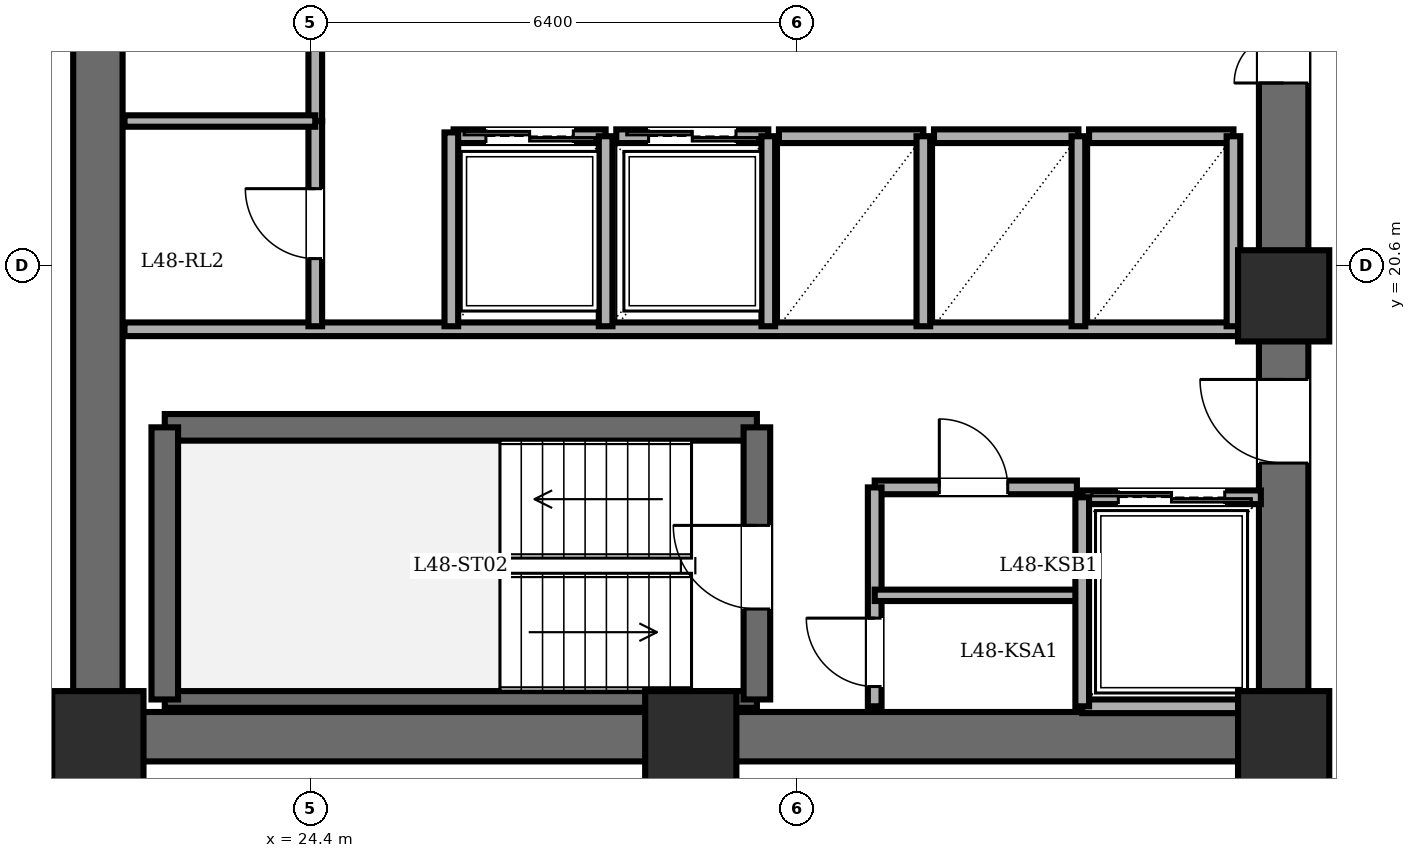
"""IFC4 building model, lengths in metres.
Left out: names, types, materials, properties, quantities, classifications, styles, units other than length and angle.
Written with IfcOpenShell. Run it as: python <this file> out.ifc"""

import sys

from ifc_helpers import new_model, si_unit, direction, frame, frame_2d, origin, origin_2d, place, context, subcontext, project, spatial, rectangle, extrude, element, fill, save


model = new_model("IFC4")
c1 = context("Model", 3, precision=1e-05, world=origin(), true_north=direction((0.0, 1.0)))
c2 = subcontext(c1, "Body", "Model", "MODEL_VIEW")
j1 = project(units=[si_unit("LENGTHUNIT", "METRE"), si_unit("PLANEANGLEUNIT", "RADIAN")], contexts=[c1])
p1 = place(None, origin())
s1 = spatial("IfcSite", under=j1, at=p1, CompositionType="ELEMENT")
p2 = place(p1, origin())
s2 = spatial("IfcBuilding", under=s1, at=p2, CompositionType="ELEMENT")
p3 = place(p2, frame((0.0, 0.0, 183.4)))
s3 = spatial("IfcBuildingStorey", under=s2, at=p3, CompositionType="ELEMENT", Elevation=183.4)
for number, where, z_axis, x_axis in (
    (1, (21.6, 14.4, 0.0), (0.0, 0.0, 1.0), (1.0, 0.0, 0.0)),
    (2, (29.4, 14.4, 0.0), (0.0, 0.0, 1.0), (1.0, 0.0, 0.0)),
    (3, (37.2, 14.4, 0.0), (0.0, 0.0, 1.0), (1.0, 0.0, 0.0)),
    (4, (37.2, 20.2, 0.0), (0.0, 0.0, 1.0), (1.0, 0.0, 0.0)),
):
    element("IfcColumn", number, at=place(p3, frame(where, z_axis=z_axis, x_axis=x_axis)), inside=s3, PredefinedType="COLUMN", context=c2, shape_type="SweptSolid", body=[
        extrude(rectangle(XDim=1.2, YDim=1.2, at=origin_2d()), origin(), (0.0, 0.0, 1.0), 3.6),
    ])
p4 = place(p3, frame((21.6, 14.4, 0.0), z_axis=(0.0, 0.0, 1.0), x_axis=(0.0, 1.0, 0.0)))
e5 = element("IfcWall", 5, at=p4, inside=s3, PredefinedType="SHEAR", context=c2, shape_type="SweptSolid", body=[
    extrude(rectangle(XDim=19.2, YDim=0.65, at=frame_2d((9.6, 0.0))), origin(), (0.0, 0.0, 1.0), 3.4),
])
p5 = place(p3, frame((37.2, 14.4, 0.0), z_axis=(0.0, 0.0, 1.0), x_axis=(-1.0, 0.0, 0.0)))
e6 = element("IfcWall", 6, at=p5, inside=s3, PredefinedType="SHEAR", context=c2, shape_type="SweptSolid", body=[
    extrude(rectangle(XDim=15.6, YDim=0.65, at=frame_2d((7.8, 0.0))), origin(), (0.0, 0.0, 1.0), 3.4),
])
p6 = place(p3, frame((37.2, 14.4, 0.0), z_axis=(0.0, 0.0, 1.0), x_axis=(0.0, 1.0, 0.0)))
e7 = element("IfcWall", 7, at=p6, inside=s3, PredefinedType="SHEAR", context=c2, shape_type="SweptSolid", body=[
    extrude(rectangle(XDim=19.2, YDim=0.65, at=frame_2d((9.6, 0.0))), origin(), (0.0, 0.0, 1.0), 3.4),
])
p7 = place(p6, frame((15.8, 0.0, 0.0)))
e8 = element("IfcOpeningElement", 8, at=p7, cuts=e7, PredefinedType="OPENING", context=c2, shape_type="SweptSolid", body=[
    extrude(rectangle(XDim=1.15, YDim=2.15, at=frame_2d((0.575, 1.075))), frame((0.0, 0.335, 0.0), z_axis=(0.0, -1.0, 0.0), x_axis=(1.0, 0.0, 0.0)), (0.0, 0.0, 1.0), 0.67),
])
p8 = place(p6, frame((3.6, 0.0, 0.0)))
e9 = element("IfcOpeningElement", 9, at=p8, cuts=e7, PredefinedType="OPENING", context=c2, shape_type="SweptSolid", body=[
    extrude(rectangle(XDim=1.1, YDim=2.15, at=frame_2d((0.55, 1.075))), frame((0.0, 0.335, 0.0), z_axis=(0.0, -1.0, 0.0), x_axis=(1.0, 0.0, 0.0)), (0.0, 0.0, 1.0), 0.67),
])
p9 = place(p6, frame((8.6, 0.0, 0.0)))
e10 = element("IfcOpeningElement", 10, at=p9, cuts=e7, PredefinedType="OPENING", context=c2, shape_type="SweptSolid", body=[
    extrude(rectangle(XDim=1.3, YDim=2.2, at=frame_2d((0.65, 1.1))), frame((0.0, 0.335, 0.0), z_axis=(0.0, -1.0, 0.0), x_axis=(1.0, 0.0, 0.0)), (0.0, 0.0, 1.0), 0.67),
])
p10 = place(p3, frame((22.48, 18.47, 0.0), z_axis=(0.0, 0.0, 1.0), x_axis=(1.0, 0.0, 0.0)))
e11 = element("IfcWall", 11, at=p10, inside=s3, PredefinedType="SOLIDWALL", context=c2, shape_type="SweptSolid", body=[
    extrude(rectangle(XDim=7.79, YDim=0.35, at=frame_2d((3.895, 0.0))), origin(), (0.0, 0.0, 1.0), 3.4),
])
p11 = place(p3, frame((22.48, 14.89, 0.0), z_axis=(0.0, 0.0, 1.0), x_axis=(1.0, 0.0, 0.0)))
e12 = element("IfcWall", 12, at=p11, inside=s3, PredefinedType="PARTITIONING", context=c2, shape_type="SweptSolid", body=[
    extrude(rectangle(XDim=7.79, YDim=0.22, at=frame_2d((3.895, 0.0))), origin(), (0.0, 0.0, 1.0), 3.4),
])
p12 = place(p3, frame((22.48, 14.89, 0.0), z_axis=(0.0, 0.0, 1.0), x_axis=(0.0, 1.0, 0.0)))
e13 = element("IfcWall", 13, at=p12, inside=s3, PredefinedType="SOLIDWALL", context=c2, shape_type="SweptSolid", body=[
    extrude(rectangle(XDim=3.58, YDim=0.35, at=frame_2d((1.79, 0.0))), origin(), (0.0, 0.0, 1.0), 3.4),
])
p13 = place(p3, frame((30.27, 14.89, 0.0), z_axis=(0.0, 0.0, 1.0), x_axis=(0.0, 1.0, 0.0)))
e14 = element("IfcWall", 14, at=p13, inside=s3, PredefinedType="SOLIDWALL", context=c2, shape_type="SweptSolid", body=[
    extrude(rectangle(XDim=3.58, YDim=0.35, at=frame_2d((1.79, 0.0))), origin(), (0.0, 0.0, 1.0), 3.4),
])
p14 = place(p13, frame((1.19, 0.0, 0.0)))
e15 = element("IfcOpeningElement", 15, at=p14, cuts=e14, PredefinedType="OPENING", context=c2, shape_type="SweptSolid", body=[
    extrude(rectangle(XDim=1.1, YDim=2.15, at=frame_2d((0.55, 1.075))), frame((0.0, 0.185, 0.0), z_axis=(0.0, -1.0, 0.0), x_axis=(1.0, 0.0, 0.0)), (0.0, 0.0, 1.0), 0.37),
])
p15 = place(p3, frame((21.95, 19.76, 0.0), z_axis=(0.0, 0.0, 1.0), x_axis=(1.0, 0.0, 0.0)))
e16 = element("IfcWall", 16, at=p15, inside=s3, PredefinedType="PARTITIONING", context=c2, shape_type="SweptSolid", body=[
    extrude(rectangle(XDim=14.87, YDim=0.18, at=frame_2d((7.435, 0.0))), origin(), (0.0, 0.0, 1.0), 3.4),
])
p16 = place(p3, frame((31.82, 17.68, 0.0), z_axis=(0.0, 0.0, 1.0), x_axis=(1.0, 0.0, 0.0)))
e17 = element("IfcWall", 17, at=p16, inside=s3, PredefinedType="PARTITIONING", context=c2, shape_type="SweptSolid", body=[
    extrude(rectangle(XDim=2.66, YDim=0.18, at=frame_2d((1.33, 0.0))), origin(), (0.0, 0.0, 1.0), 3.4),
])
p17 = place(p16, frame((0.85, 0.0, 0.0)))
e18 = element("IfcOpeningElement", 18, at=p17, cuts=e17, PredefinedType="OPENING", context=c2, shape_type="SweptSolid", body=[
    extrude(rectangle(XDim=0.9, YDim=2.05, at=frame_2d((0.45, 1.025))), frame((0.0, 0.1, 0.0), z_axis=(0.0, -1.0, 0.0), x_axis=(1.0, 0.0, 0.0)), (0.0, 0.0, 1.0), 0.2),
])
p18 = place(p3, frame((31.82, 14.8, 0.0), z_axis=(0.0, 0.0, 1.0), x_axis=(0.0, 1.0, 0.0)))
e19 = element("IfcWall", 19, at=p18, inside=s3, PredefinedType="PARTITIONING", context=c2, shape_type="SweptSolid", body=[
    extrude(rectangle(XDim=2.88, YDim=0.18, at=frame_2d((1.44, 0.0))), origin(), (0.0, 0.0, 1.0), 3.4),
])
p19 = place(p18, frame((0.26, 0.0, 0.0)))
e20 = element("IfcOpeningElement", 20, at=p19, cuts=e19, PredefinedType="OPENING", context=c2, shape_type="SweptSolid", body=[
    extrude(rectangle(XDim=0.9, YDim=2.05, at=frame_2d((0.45, 1.025))), frame((0.0, 0.1, 0.0), z_axis=(0.0, -1.0, 0.0), x_axis=(1.0, 0.0, 0.0)), (0.0, 0.0, 1.0), 0.2),
])
p20 = place(p3, frame((31.82, 16.26, 0.0), z_axis=(0.0, 0.0, 1.0), x_axis=(1.0, 0.0, 0.0)))
e21 = element("IfcWall", 21, at=p20, inside=s3, PredefinedType="PARTITIONING", context=c2, shape_type="SweptSolid", body=[
    extrude(rectangle(XDim=2.66, YDim=0.15, at=frame_2d((1.33, 0.0))), origin(), (0.0, 0.0, 1.0), 3.4),
])
p21 = place(p3, frame((34.55, 17.55, 0.0), z_axis=(0.0, 0.0, 1.0), x_axis=(1.0, 0.0, 0.0)))
e22 = element("IfcWall", 22, at=p21, inside=s3, PredefinedType="PARTITIONING", context=c2, shape_type="SweptSolid", body=[
    extrude(rectangle(XDim=2.35, YDim=0.18, at=frame_2d((1.175, 0.0))), origin(), (0.0, 0.0, 1.0), 3.4),
])
p22 = place(p21, frame((0.475, 0.0, 0.0)))
e23 = element("IfcOpeningElement", 23, at=p22, cuts=e22, PredefinedType="OPENING", context=c2, shape_type="SweptSolid", body=[
    extrude(rectangle(XDim=1.4, YDim=2.3, at=frame_2d((0.7, 1.15))), frame((0.0, 0.1, 0.0), z_axis=(0.0, -1.0, 0.0), x_axis=(1.0, 0.0, 0.0)), (0.0, 0.0, 1.0), 0.2),
])
p23 = place(p3, frame((36.9, 14.8, 0.0), z_axis=(0.0, 0.0, 1.0), x_axis=(-1.0, 0.0, 0.0)))
e24 = element("IfcWall", 24, at=p23, inside=s3, PredefinedType="PARTITIONING", context=c2, shape_type="SweptSolid", body=[
    extrude(rectangle(XDim=2.35, YDim=0.18, at=frame_2d((1.175, 0.0))), origin(), (0.0, 0.0, 1.0), 3.4),
])
p24 = place(p3, frame((34.55, 17.55, 0.0), z_axis=(0.0, 0.0, 1.0), x_axis=(0.0, -1.0, 0.0)))
e25 = element("IfcWall", 25, at=p24, inside=s3, PredefinedType="PARTITIONING", context=c2, shape_type="SweptSolid", body=[
    extrude(rectangle(XDim=2.75, YDim=0.18, at=frame_2d((1.375, 0.0))), origin(), (0.0, 0.0, 1.0), 3.4),
])
p25 = place(p3, frame((26.28, 22.3, 0.0), z_axis=(0.0, 0.0, 1.0), x_axis=(1.0, 0.0, 0.0)))
e26 = element("IfcWall", 26, at=p25, inside=s3, PredefinedType="PARTITIONING", context=c2, shape_type="SweptSolid", body=[
    extrude(rectangle(XDim=2.0, YDim=0.18, at=frame_2d((1.0, 0.0))), origin(), (0.0, 0.0, 1.0), 3.4),
])
p26 = place(p25, frame((0.425, 0.0, 0.0)))
e27 = element("IfcOpeningElement", 27, at=p26, cuts=e26, PredefinedType="OPENING", context=c2, shape_type="SweptSolid", body=[
    extrude(rectangle(XDim=1.15, YDim=2.2, at=frame_2d((0.575, 1.1))), frame((0.0, 0.1, 0.0), z_axis=(0.0, -1.0, 0.0), x_axis=(1.0, 0.0, 0.0)), (0.0, 0.0, 1.0), 0.2),
])
p27 = place(p3, frame((28.28, 19.8, 0.0), z_axis=(0.0, 0.0, 1.0), x_axis=(0.0, 1.0, 0.0)))
e28 = element("IfcWall", 28, at=p27, inside=s3, PredefinedType="PARTITIONING", context=c2, shape_type="SweptSolid", body=[
    extrude(rectangle(XDim=2.5, YDim=0.18, at=frame_2d((1.25, 0.0))), origin(), (0.0, 0.0, 1.0), 3.4),
])
p28 = place(p3, frame((28.42, 22.3, 0.0), z_axis=(0.0, 0.0, 1.0), x_axis=(1.0, 0.0, 0.0)))
e29 = element("IfcWall", 29, at=p28, inside=s3, PredefinedType="PARTITIONING", context=c2, shape_type="SweptSolid", body=[
    extrude(rectangle(XDim=2.0, YDim=0.18, at=frame_2d((1.0, 0.0))), origin(), (0.0, 0.0, 1.0), 3.4),
])
p29 = place(p28, frame((0.425, 0.0, 0.0)))
e30 = element("IfcOpeningElement", 30, at=p29, cuts=e29, PredefinedType="OPENING", context=c2, shape_type="SweptSolid", body=[
    extrude(rectangle(XDim=1.15, YDim=2.2, at=frame_2d((0.575, 1.1))), frame((0.0, 0.1, 0.0), z_axis=(0.0, -1.0, 0.0), x_axis=(1.0, 0.0, 0.0)), (0.0, 0.0, 1.0), 0.2),
])
p30 = place(p3, frame((30.42, 19.8, 0.0), z_axis=(0.0, 0.0, 1.0), x_axis=(0.0, 1.0, 0.0)))
e31 = element("IfcWall", 31, at=p30, inside=s3, PredefinedType="PARTITIONING", context=c2, shape_type="SweptSolid", body=[
    extrude(rectangle(XDim=2.5, YDim=0.18, at=frame_2d((1.25, 0.0))), origin(), (0.0, 0.0, 1.0), 3.4),
])
p31 = place(p3, frame((30.56, 22.3, 0.0), z_axis=(0.0, 0.0, 1.0), x_axis=(1.0, 0.0, 0.0)))
e32 = element("IfcWall", 32, at=p31, inside=s3, PredefinedType="PARTITIONING", context=c2, shape_type="SweptSolid", body=[
    extrude(rectangle(XDim=1.9, YDim=0.18, at=frame_2d((0.95, 0.0))), origin(), (0.0, 0.0, 1.0), 3.4),
])
p32 = place(p3, frame((32.46, 19.8, 0.0), z_axis=(0.0, 0.0, 1.0), x_axis=(0.0, 1.0, 0.0)))
e33 = element("IfcWall", 33, at=p32, inside=s3, PredefinedType="PARTITIONING", context=c2, shape_type="SweptSolid", body=[
    extrude(rectangle(XDim=2.5, YDim=0.18, at=frame_2d((1.25, 0.0))), origin(), (0.0, 0.0, 1.0), 3.4),
])
p33 = place(p3, frame((32.6, 22.3, 0.0), z_axis=(0.0, 0.0, 1.0), x_axis=(1.0, 0.0, 0.0)))
e34 = element("IfcWall", 34, at=p33, inside=s3, PredefinedType="PARTITIONING", context=c2, shape_type="SweptSolid", body=[
    extrude(rectangle(XDim=1.9, YDim=0.18, at=frame_2d((0.95, 0.0))), origin(), (0.0, 0.0, 1.0), 3.4),
])
p34 = place(p3, frame((34.5, 19.8, 0.0), z_axis=(0.0, 0.0, 1.0), x_axis=(0.0, 1.0, 0.0)))
e35 = element("IfcWall", 35, at=p34, inside=s3, PredefinedType="PARTITIONING", context=c2, shape_type="SweptSolid", body=[
    extrude(rectangle(XDim=2.5, YDim=0.18, at=frame_2d((1.25, 0.0))), origin(), (0.0, 0.0, 1.0), 3.4),
])
p35 = place(p3, frame((34.64, 22.3, 0.0), z_axis=(0.0, 0.0, 1.0), x_axis=(1.0, 0.0, 0.0)))
e36 = element("IfcWall", 36, at=p35, inside=s3, PredefinedType="PARTITIONING", context=c2, shape_type="SweptSolid", body=[
    extrude(rectangle(XDim=1.9, YDim=0.18, at=frame_2d((0.95, 0.0))), origin(), (0.0, 0.0, 1.0), 3.4),
])
p36 = place(p3, frame((36.54, 19.8, 0.0), z_axis=(0.0, 0.0, 1.0), x_axis=(0.0, 1.0, 0.0)))
e37 = element("IfcWall", 37, at=p36, inside=s3, PredefinedType="PARTITIONING", context=c2, shape_type="SweptSolid", body=[
    extrude(rectangle(XDim=2.5, YDim=0.18, at=frame_2d((1.25, 0.0))), origin(), (0.0, 0.0, 1.0), 3.4),
])
p37 = place(p3, frame((24.46, 22.5, 0.0), z_axis=(0.0, 0.0, 1.0), x_axis=(0.0, 1.0, 0.0)))
e38 = element("IfcWall", 38, at=p37, inside=s3, PredefinedType="PARTITIONING", context=c2, shape_type="SweptSolid", body=[
    extrude(rectangle(XDim=5.0, YDim=0.18, at=frame_2d((2.5, 0.0))), origin(), (0.0, 0.0, 1.0), 3.4),
])
p38 = place(p37, frame((2.04, 0.0, 0.0)))
e39 = element("IfcOpeningElement", 39, at=p38, cuts=e38, PredefinedType="OPENING", context=c2, shape_type="SweptSolid", body=[
    extrude(rectangle(XDim=0.92, YDim=2.1, at=frame_2d((0.46, 1.05))), frame((0.0, 0.1, 0.0), z_axis=(0.0, -1.0, 0.0), x_axis=(1.0, 0.0, 0.0)), (0.0, 0.0, 1.0), 0.2),
])
p39 = place(p3, frame((24.46, 19.8, 0.0), z_axis=(0.0, 0.0, 1.0), x_axis=(0.0, 1.0, 0.0)))
e40 = element("IfcWall", 40, at=p39, inside=s3, PredefinedType="PARTITIONING", context=c2, shape_type="SweptSolid", body=[
    extrude(rectangle(XDim=2.7, YDim=0.18, at=frame_2d((1.35, 0.0))), origin(), (0.0, 0.0, 1.0), 3.4),
])
p40 = place(p39, frame((0.89, 0.0, 0.0)))
e41 = element("IfcOpeningElement", 41, at=p40, cuts=e40, PredefinedType="OPENING", context=c2, shape_type="SweptSolid", body=[
    extrude(rectangle(XDim=0.92, YDim=2.1, at=frame_2d((0.46, 1.05))), frame((0.0, 0.1, 0.0), z_axis=(0.0, -1.0, 0.0), x_axis=(1.0, 0.0, 0.0)), (0.0, 0.0, 1.0), 0.2),
])
p41 = place(p3, frame((21.95, 22.5, 0.0), z_axis=(0.0, 0.0, 1.0), x_axis=(1.0, 0.0, 0.0)))
e42 = element("IfcWall", 42, at=p41, inside=s3, PredefinedType="PARTITIONING", context=c2, shape_type="SweptSolid", body=[
    extrude(rectangle(XDim=2.51, YDim=0.15, at=frame_2d((1.255, 0.0))), origin(), (0.0, 0.0, 1.0), 3.4),
])
p42 = place(p3, frame((26.25, 19.8, 0.0), z_axis=(0.0, 0.0, 1.0), x_axis=(0.0, 1.0, 0.0)))
e43 = element("IfcWall", 43, at=p42, inside=s3, PredefinedType="PARTITIONING", context=c2, shape_type="SweptSolid", body=[
    extrude(rectangle(XDim=2.55, YDim=0.18, at=frame_2d((1.275, 0.0))), origin(), (0.0, 0.0, 1.0), 3.4),
])
p43 = place(p3, frame((13.8, 14.18, 0.0), z_axis=(0.0, 0.0, 1.0), x_axis=(1.0, 0.0, 0.0)))
e44 = element("IfcWall", 44, at=p43, inside=s3, PredefinedType="PARTITIONING", context=c2, shape_type="SweptSolid", body=[
    extrude(rectangle(XDim=7.68, YDim=0.18, at=frame_2d((3.84, 0.0))), origin(), (0.0, 0.0, 1.0), 3.4),
])
p44 = place(p43, frame((3.68, 0.0, 0.0)))
e45 = element("IfcOpeningElement", 45, at=p44, cuts=e44, PredefinedType="OPENING", context=c2, shape_type="SweptSolid", body=[
    extrude(rectangle(XDim=1.0, YDim=2.15, at=frame_2d((0.5, 1.075))), frame((0.0, 0.1, 0.0), z_axis=(0.0, -1.0, 0.0), x_axis=(1.0, 0.0, 0.0)), (0.0, 0.0, 1.0), 0.2),
])
p45 = place(p14, origin())
e46 = element("IfcDoor", 46, at=p45, inside=s3, OperationType="SINGLE_SWING_RIGHT", PredefinedType="DOOR", context=c2, shape_type="SweptSolid", body=[
    extrude(rectangle(XDim=1.1, YDim=2.15, at=frame_2d((0.55, 1.075))), frame((0.0, 0.025, 0.0), z_axis=(0.0, -1.0, 0.0), x_axis=(1.0, 0.0, 0.0)), (0.0, 0.0, 1.0), 0.05),
])
fill(e15, e46)
p46 = place(p8, origin())
e47 = element("IfcDoor", 47, at=p46, inside=s3, OperationType="SINGLE_SWING_RIGHT", PredefinedType="DOOR", context=c2, shape_type="SweptSolid", body=[
    extrude(rectangle(XDim=1.1, YDim=2.15, at=frame_2d((0.55, 1.075))), frame((0.0, 0.025, 0.0), z_axis=(0.0, -1.0, 0.0), x_axis=(1.0, 0.0, 0.0)), (0.0, 0.0, 1.0), 0.05),
])
fill(e9, e47)
p47 = place(p17, origin())
e48 = element("IfcDoor", 48, at=p47, inside=s3, OperationType="SINGLE_SWING_LEFT", PredefinedType="DOOR", context=c2, shape_type="SweptSolid", body=[
    extrude(rectangle(XDim=0.9, YDim=2.05, at=frame_2d((0.45, 1.025))), frame((0.0, 0.025, 0.0), z_axis=(0.0, -1.0, 0.0), x_axis=(1.0, 0.0, 0.0)), (0.0, 0.0, 1.0), 0.05),
])
fill(e18, e48)
p48 = place(p19, origin())
e49 = element("IfcDoor", 49, at=p48, inside=s3, OperationType="SINGLE_SWING_RIGHT", PredefinedType="DOOR", context=c2, shape_type="SweptSolid", body=[
    extrude(rectangle(XDim=0.9, YDim=2.05, at=frame_2d((0.45, 1.025))), frame((0.0, 0.025, 0.0), z_axis=(0.0, -1.0, 0.0), x_axis=(1.0, 0.0, 0.0)), (0.0, 0.0, 1.0), 0.05),
])
fill(e20, e49)
p49 = place(p22, origin())
e50 = element("IfcDoor", 50, at=p49, inside=s3, OperationType="DOUBLE_DOOR_SLIDING", PredefinedType="DOOR", context=c2, shape_type="SweptSolid", body=[
    extrude(rectangle(XDim=1.4, YDim=2.3, at=frame_2d((0.7, 1.15))), frame((0.0, 0.025, 0.0), z_axis=(0.0, -1.0, 0.0), x_axis=(1.0, 0.0, 0.0)), (0.0, 0.0, 1.0), 0.05),
])
fill(e23, e50)
p50 = place(p26, origin())
e51 = element("IfcDoor", 51, at=p50, inside=s3, OperationType="DOUBLE_DOOR_SLIDING", PredefinedType="DOOR", context=c2, shape_type="SweptSolid", body=[
    extrude(rectangle(XDim=1.15, YDim=2.2, at=frame_2d((0.575, 1.1))), frame((0.0, 0.025, 0.0), z_axis=(0.0, -1.0, 0.0), x_axis=(1.0, 0.0, 0.0)), (0.0, 0.0, 1.0), 0.05),
])
fill(e27, e51)
p51 = place(p29, origin())
e52 = element("IfcDoor", 52, at=p51, inside=s3, OperationType="DOUBLE_DOOR_SLIDING", PredefinedType="DOOR", context=c2, shape_type="SweptSolid", body=[
    extrude(rectangle(XDim=1.15, YDim=2.2, at=frame_2d((0.575, 1.1))), frame((0.0, 0.025, 0.0), z_axis=(0.0, -1.0, 0.0), x_axis=(1.0, 0.0, 0.0)), (0.0, 0.0, 1.0), 0.05),
])
fill(e30, e52)
p52 = place(p40, origin())
e53 = element("IfcDoor", 53, at=p52, inside=s3, OperationType="SINGLE_SWING_RIGHT", PredefinedType="DOOR", context=c2, shape_type="SweptSolid", body=[
    extrude(rectangle(XDim=0.92, YDim=2.1, at=frame_2d((0.46, 1.05))), frame((0.0, 0.025, 0.0), z_axis=(0.0, -1.0, 0.0), x_axis=(1.0, 0.0, 0.0)), (0.0, 0.0, 1.0), 0.05),
])
fill(e41, e53)
p53 = place(p9, origin())
e54 = element("IfcDoor", 54, at=p53, inside=s3, OperationType="DOUBLE_DOOR_SINGLE_SWING", PredefinedType="DOOR", context=c2, shape_type="SweptSolid", body=[
    extrude(rectangle(XDim=1.3, YDim=2.2, at=frame_2d((0.65, 1.1))), frame((0.0, 0.025, 0.0), z_axis=(0.0, -1.0, 0.0), x_axis=(1.0, 0.0, 0.0)), (0.0, 0.0, 1.0), 0.05),
])
fill(e10, e54)
save(model, sys.argv[1])
